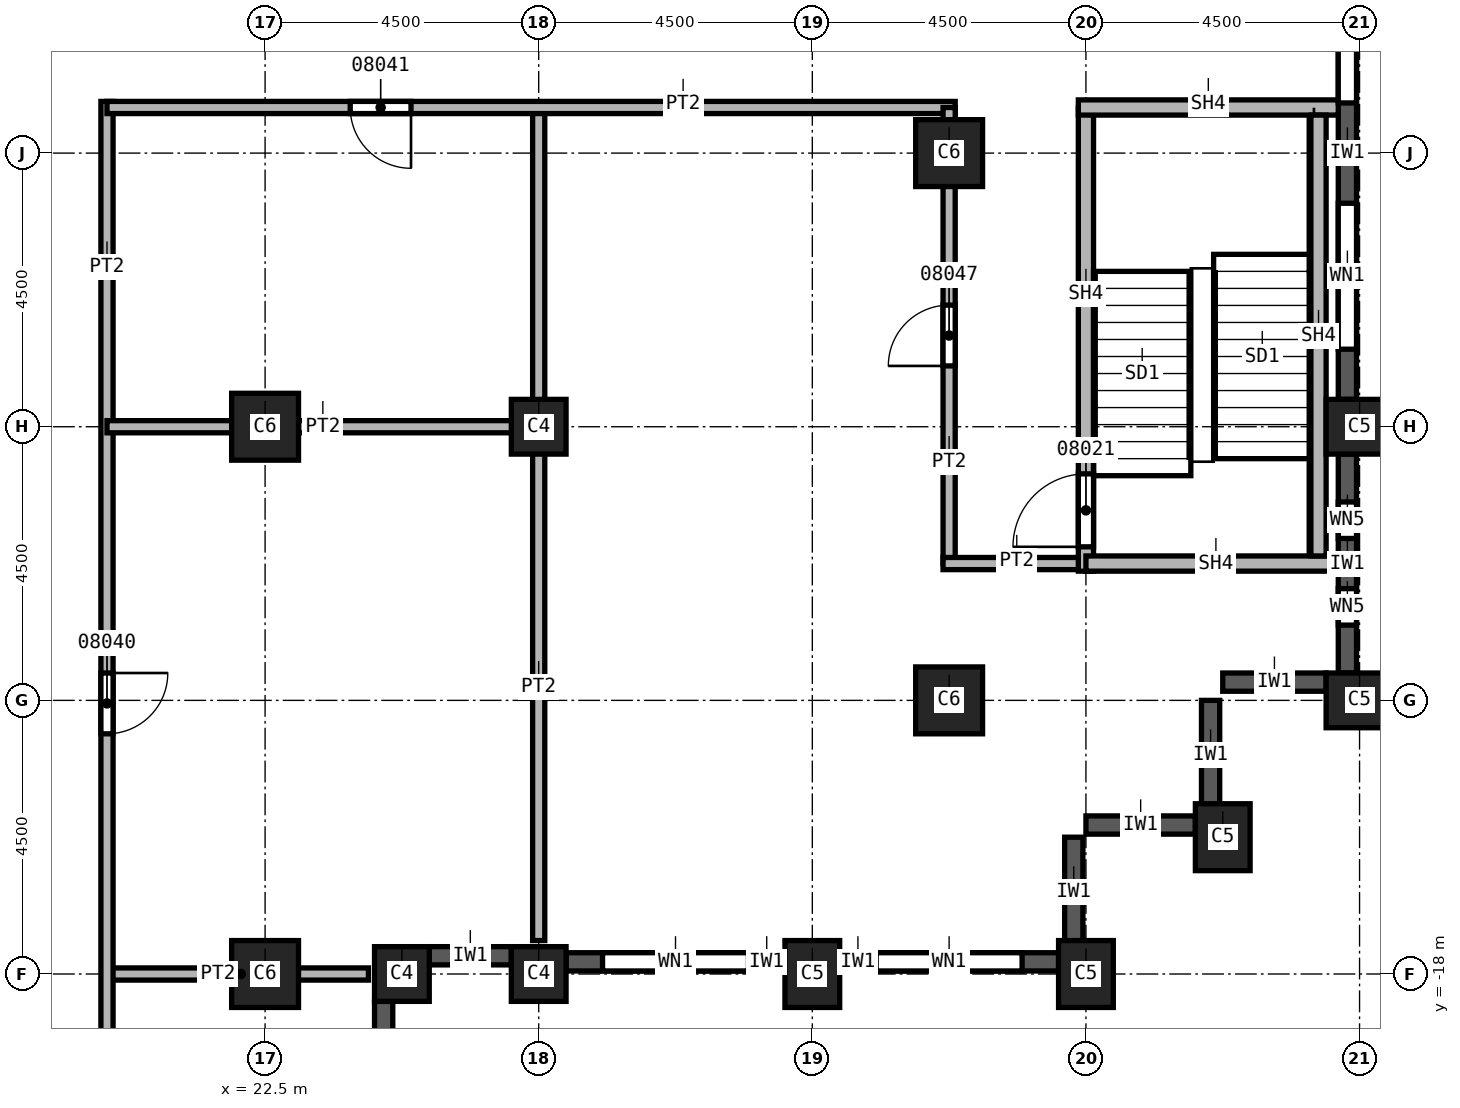
"""IFC4 building model, lengths in metres.
Left out: names, types, materials, properties, quantities, classifications, styles, units other than length and angle.
Written with IfcOpenShell. Run it as: python <this file> out.ifc"""

import sys

from ifc_helpers import new_model, si_unit, direction, frame, frame_2d, origin, origin_2d, place, context, subcontext, project, spatial, rectangle, extrude, element, fill, save


model = new_model("IFC4")
c1 = context("Model", 3, precision=1e-05, world=origin(), true_north=direction((0.0, 1.0)))
c2 = subcontext(c1, "Body", "Model", "MODEL_VIEW")
j1 = project(units=[si_unit("LENGTHUNIT", "METRE"), si_unit("PLANEANGLEUNIT", "RADIAN")], contexts=[c1])
p1 = place(None, origin())
s1 = spatial("IfcSite", under=j1, at=p1, CompositionType="ELEMENT")
p2 = place(p1, origin())
s2 = spatial("IfcBuilding", under=s1, at=p2, CompositionType="ELEMENT")
p3 = place(p2, frame((0.0, 0.0, 150.0)))
s3 = spatial("IfcBuildingStorey", under=s2, at=p3, CompositionType="ELEMENT", Elevation=150.0)
for number, where, z_axis, x_axis in (
    (1, (40.5, -9.0, 0.0), (0.0, 0.0, 1.0), (0.0, 1.0, 0.0)),
    (2, (40.5, -13.5, 0.0), (0.0, 0.0, 1.0), (0.0, 1.0, 0.0)),
    (3, (38.25, -15.75, 0.0), (0.0, 0.0, 1.0), (1.0, 0.0, 0.0)),
    (4, (31.5, -18.0, 0.0), (0.0, 0.0, 1.0), (1.0, 0.0, 0.0)),
    (5, (36.0, -18.0, 0.0), (0.0, 0.0, 1.0), (1.0, 0.0, 0.0)),
):
    element("IfcColumn", number, at=place(p3, frame(where, z_axis=z_axis, x_axis=x_axis)), inside=s3, PredefinedType="COLUMN", context=c2, shape_type="SweptSolid", body=[
        extrude(rectangle(XDim=0.9, YDim=1.1, at=origin_2d()), origin(), (0.0, 0.0, 1.0), 3.7),
    ])
for number, where, z_axis, x_axis in (
    (6, (33.75, -4.5, 0.0), (0.0, 0.0, 1.0), (1.0, 0.0, 0.0)),
    (7, (33.75, -13.5, 0.0), (0.0, 0.0, 1.0), (1.0, 0.0, 0.0)),
    (8, (22.5, -9.0, 0.0), (0.0, 0.0, 1.0), (1.0, 0.0, 0.0)),
    (9, (22.5, -18.0, 0.0), (0.0, 0.0, 1.0), (1.0, 0.0, 0.0)),
):
    element("IfcColumn", number, at=place(p3, frame(where, z_axis=z_axis, x_axis=x_axis)), inside=s3, PredefinedType="COLUMN", context=c2, shape_type="SweptSolid", body=[
        extrude(rectangle(XDim=1.1, YDim=1.1, at=origin_2d()), origin(), (0.0, 0.0, 1.0), 3.7),
    ])
for number, where, z_axis, x_axis in (
    (10, (27.0, -9.0, 0.0), (0.0, 0.0, 1.0), (1.0, 0.0, 0.0)),
    (11, (27.0, -18.0, 0.0), (0.0, 0.0, 1.0), (1.0, 0.0, 0.0)),
    (12, (24.75, -18.0, 0.0), (0.0, 0.0, 1.0), (1.0, 0.0, 0.0)),
):
    element("IfcColumn", number, at=place(p3, frame(where, z_axis=z_axis, x_axis=x_axis)), inside=s3, PredefinedType="COLUMN", context=c2, shape_type="SweptSolid", body=[
        extrude(rectangle(XDim=0.9, YDim=0.9, at=origin_2d()), origin(), (0.0, 0.0, 1.0), 3.7),
    ])
for number, where, z_axis, x_axis in (
    (13, (35.8, -17.55, 0.0), (0.0, 0.0, 1.0), (0.0, 1.0, 0.0)),
    (14, (37.8, -15.55, 0.0), (0.0, 0.0, 1.0), (-1.0, 0.0, 0.0)),
    (15, (38.05, -15.3, 0.0), (0.0, 0.0, 1.0), (0.0, 1.0, 0.0)),
):
    element("IfcWall", number, at=place(p3, frame(where, z_axis=z_axis, x_axis=x_axis)), inside=s3, PredefinedType="SOLIDWALL", context=c2, shape_type="SweptSolid", body=[
        extrude(rectangle(XDim=1.8, YDim=0.3, at=frame_2d((0.9, 0.0))), origin(), (0.0, 0.0, 1.0), 3.1),
    ])
p4 = place(p3, frame((39.95, -13.2, 0.0), z_axis=(0.0, 0.0, 1.0), x_axis=(-1.0, 0.0, 0.0)))
e16 = element("IfcWall", 16, at=p4, inside=s3, PredefinedType="SOLIDWALL", context=c2, shape_type="SweptSolid", body=[
    extrude(rectangle(XDim=1.7, YDim=0.3, at=frame_2d((0.85, 0.0))), origin(), (0.0, 0.0, 1.0), 3.1),
])
p5 = place(p3, frame((24.45, -20.35, 0.0), z_axis=(0.0, 0.0, 1.0), x_axis=(0.0, 1.0, 0.0)))
e17 = element("IfcWall", 17, at=p5, inside=s3, PredefinedType="SOLIDWALL", context=c2, shape_type="SweptSolid", body=[
    extrude(rectangle(XDim=1.9, YDim=0.3, at=frame_2d((0.95, 0.0))), origin(), (0.0, 0.0, 1.0), 3.1),
])
p6 = place(p3, frame((25.2, -17.7, 0.0), z_axis=(0.0, 0.0, 1.0), x_axis=(1.0, 0.0, 0.0)))
e18 = element("IfcWall", 18, at=p6, inside=s3, PredefinedType="SOLIDWALL", context=c2, shape_type="SweptSolid", body=[
    extrude(rectangle(XDim=1.35, YDim=0.3, at=frame_2d((0.675, 0.0))), origin(), (0.0, 0.0, 1.0), 3.1),
])
p7 = place(p3, frame((27.45, -17.8, 0.0), z_axis=(0.0, 0.0, 1.0), x_axis=(1.0, 0.0, 0.0)))
e19 = element("IfcWall", 19, at=p7, inside=s3, PredefinedType="SOLIDWALL", context=c2, shape_type="SweptSolid", body=[
    extrude(rectangle(XDim=3.6, YDim=0.3, at=frame_2d((1.8, 0.0))), origin(), (0.0, 0.0, 1.0), 3.1),
])
p8 = place(p7, frame((0.6, 0.0, 0.8)))
e20 = element("IfcOpeningElement", 20, at=p8, cuts=e19, PredefinedType="OPENING", context=c2, shape_type="SweptSolid", body=[
    extrude(rectangle(XDim=2.4, YDim=1.95, at=frame_2d((1.2, 0.975))), frame((0.0, 0.15, 0.0), z_axis=(0.0, -1.0, 0.0), x_axis=(1.0, 0.0, 0.0)), (0.0, 0.0, 1.0), 0.3),
])
p9 = place(p3, frame((31.95, -17.8, 0.0), z_axis=(0.0, 0.0, 1.0), x_axis=(1.0, 0.0, 0.0)))
e21 = element("IfcWall", 21, at=p9, inside=s3, PredefinedType="SOLIDWALL", context=c2, shape_type="SweptSolid", body=[
    extrude(rectangle(XDim=3.6, YDim=0.3, at=frame_2d((1.8, 0.0))), origin(), (0.0, 0.0, 1.0), 3.1),
])
p10 = place(p9, frame((0.6, 0.0, 0.8)))
e22 = element("IfcOpeningElement", 22, at=p10, cuts=e21, PredefinedType="OPENING", context=c2, shape_type="SweptSolid", body=[
    extrude(rectangle(XDim=2.4, YDim=1.95, at=frame_2d((1.2, 0.975))), frame((0.0, 0.15, 0.0), z_axis=(0.0, -1.0, 0.0), x_axis=(1.0, 0.0, 0.0)), (0.0, 0.0, 1.0), 0.3),
])
p11 = place(p3, frame((40.3, -13.05, 0.0), z_axis=(0.0, 0.0, 1.0), x_axis=(0.0, 1.0, 0.0)))
e23 = element("IfcWall", 23, at=p11, inside=s3, PredefinedType="SOLIDWALL", context=c2, shape_type="SweptSolid", body=[
    extrude(rectangle(XDim=3.6, YDim=0.3, at=frame_2d((1.8, 0.0))), origin(), (0.0, 0.0, 1.0), 3.1),
])
p12 = place(p11, frame((0.788, 0.0, 0.8)))
e24 = element("IfcOpeningElement", 24, at=p12, cuts=e23, PredefinedType="OPENING", context=c2, shape_type="SweptSolid", body=[
    extrude(rectangle(XDim=0.6, YDim=1.95, at=frame_2d((0.3, 0.975))), frame((0.0, 0.15, 0.0), z_axis=(0.0, -1.0, 0.0), x_axis=(1.0, 0.0, 0.0)), (0.0, 0.0, 1.0), 0.3),
])
p13 = place(p11, frame((2.212, 0.0, 0.8)))
e25 = element("IfcOpeningElement", 25, at=p13, cuts=e23, PredefinedType="OPENING", context=c2, shape_type="SweptSolid", body=[
    extrude(rectangle(XDim=0.6, YDim=1.95, at=frame_2d((0.3, 0.975))), frame((0.0, 0.15, 0.0), z_axis=(0.0, -1.0, 0.0), x_axis=(1.0, 0.0, 0.0)), (0.0, 0.0, 1.0), 0.3),
])
p14 = place(p3, frame((40.3, -8.55, 0.0), z_axis=(0.0, 0.0, 1.0), x_axis=(0.0, 1.0, 0.0)))
e26 = element("IfcWall", 26, at=p14, inside=s3, PredefinedType="SOLIDWALL", context=c2, shape_type="SweptSolid", body=[
    extrude(rectangle(XDim=8.1, YDim=0.3, at=frame_2d((4.05, 0.0))), origin(), (0.0, 0.0, 1.0), 3.1),
])
p15 = place(p14, frame((0.825, 0.0, 0.8)))
e27 = element("IfcOpeningElement", 27, at=p15, cuts=e26, PredefinedType="OPENING", context=c2, shape_type="SweptSolid", body=[
    extrude(rectangle(XDim=2.4, YDim=1.95, at=frame_2d((1.2, 0.975))), frame((0.0, 0.15, 0.0), z_axis=(0.0, -1.0, 0.0), x_axis=(1.0, 0.0, 0.0)), (0.0, 0.0, 1.0), 0.3),
])
p16 = place(p14, frame((4.875, 0.0, 0.8)))
e28 = element("IfcOpeningElement", 28, at=p16, cuts=e26, PredefinedType="OPENING", context=c2, shape_type="SweptSolid", body=[
    extrude(rectangle(XDim=2.4, YDim=1.95, at=frame_2d((1.2, 0.975))), frame((0.0, 0.15, 0.0), z_axis=(0.0, -1.0, 0.0), x_axis=(1.0, 0.0, 0.0)), (0.0, 0.0, 1.0), 0.3),
])
p17 = place(p3, frame((19.9, -18.0, 0.0), z_axis=(0.0, 0.0, 1.0), x_axis=(1.0, 0.0, 0.0)))
e29 = element("IfcWall", 29, at=p17, inside=s3, PredefinedType="PARTITIONING", context=c2, shape_type="SweptSolid", body=[
    extrude(rectangle(XDim=4.3, YDim=0.2, at=frame_2d((2.15, 0.0))), origin(), (0.0, 0.0, 1.0), 3.7),
])
p18 = place(p3, frame((19.9, -3.65, 0.0), z_axis=(0.0, 0.0, 1.0), x_axis=(0.0, -1.0, 0.0)))
e30 = element("IfcWall", 30, at=p18, inside=s3, PredefinedType="PARTITIONING", context=c2, shape_type="SweptSolid", body=[
    extrude(rectangle(XDim=19.6, YDim=0.2, at=frame_2d((9.8, 0.0))), origin(), (0.0, 0.0, 1.0), 3.7),
])
p19 = place(p18, frame((17.35, 0.0, 0.0)))
e31 = element("IfcOpeningElement", 31, at=p19, cuts=e30, PredefinedType="OPENING", context=c2, shape_type="SweptSolid", body=[
    extrude(rectangle(XDim=1.0, YDim=2.1, at=frame_2d((0.5, 1.05))), frame((0.0, 0.1, 0.0), z_axis=(0.0, -1.0, 0.0), x_axis=(1.0, 0.0, 0.0)), (0.0, 0.0, 1.0), 0.2),
])
p20 = place(p18, frame((9.4, 0.0, 0.0)))
e32 = element("IfcOpeningElement", 32, at=p20, cuts=e30, PredefinedType="OPENING", context=c2, shape_type="SweptSolid", body=[
    extrude(rectangle(XDim=1.0, YDim=2.1, at=frame_2d((0.5, 1.05))), frame((0.0, 0.1, 0.0), z_axis=(0.0, -1.0, 0.0), x_axis=(1.0, 0.0, 0.0)), (0.0, 0.0, 1.0), 0.2),
])
p21 = place(p3, frame((19.9, -9.0, 0.0), z_axis=(0.0, 0.0, 1.0), x_axis=(1.0, 0.0, 0.0)))
e33 = element("IfcWall", 33, at=p21, inside=s3, PredefinedType="PARTITIONING", context=c2, shape_type="SweptSolid", body=[
    extrude(rectangle(XDim=7.2, YDim=0.2, at=frame_2d((3.6, 0.0))), origin(), (0.0, 0.0, 1.0), 3.7),
])
p22 = place(p3, frame((27.0, -3.75, 0.0), z_axis=(0.0, 0.0, 1.0), x_axis=(0.0, -1.0, 0.0)))
e34 = element("IfcWall", 34, at=p22, inside=s3, PredefinedType="PARTITIONING", context=c2, shape_type="SweptSolid", body=[
    extrude(rectangle(XDim=13.7, YDim=0.2, at=frame_2d((6.85, 0.0))), origin(), (0.0, 0.0, 1.0), 3.7),
])
p23 = place(p3, frame((33.85, -3.75, 0.0), z_axis=(0.0, 0.0, 1.0), x_axis=(-1.0, 0.0, 0.0)))
e35 = element("IfcWall", 35, at=p23, inside=s3, PredefinedType="PARTITIONING", context=c2, shape_type="SweptSolid", body=[
    extrude(rectangle(XDim=13.95, YDim=0.2, at=frame_2d((6.975, 0.0))), origin(), (0.0, 0.0, 1.0), 3.7),
])
p24 = place(p23, frame((8.95, 0.0, 0.0)))
e36 = element("IfcOpeningElement", 36, at=p24, cuts=e35, PredefinedType="OPENING", context=c2, shape_type="SweptSolid", body=[
    extrude(rectangle(XDim=1.0, YDim=2.1, at=frame_2d((0.5, 1.05))), frame((0.0, 0.1, 0.0), z_axis=(0.0, -1.0, 0.0), x_axis=(1.0, 0.0, 0.0)), (0.0, 0.0, 1.0), 0.2),
])
p25 = place(p3, frame((33.75, -11.25, 0.0), z_axis=(0.0, 0.0, 1.0), x_axis=(0.0, 1.0, 0.0)))
e37 = element("IfcWall", 37, at=p25, inside=s3, PredefinedType="PARTITIONING", context=c2, shape_type="SweptSolid", body=[
    extrude(rectangle(XDim=7.5, YDim=0.2, at=frame_2d((3.75, 0.0))), origin(), (0.0, 0.0, 1.0), 3.7),
])
p26 = place(p25, frame((3.25, 0.0, 0.0)))
e38 = element("IfcOpeningElement", 38, at=p26, cuts=e37, PredefinedType="OPENING", context=c2, shape_type="SweptSolid", body=[
    extrude(rectangle(XDim=1.0, YDim=2.1, at=frame_2d((0.5, 1.05))), frame((0.0, 0.1, 0.0), z_axis=(0.0, -1.0, 0.0), x_axis=(1.0, 0.0, 0.0)), (0.0, 0.0, 1.0), 0.2),
])
p27 = place(p3, frame((36.0, -11.25, 0.0), z_axis=(0.0, 0.0, 1.0), x_axis=(-1.0, 0.0, 0.0)))
e39 = element("IfcWall", 39, at=p27, inside=s3, PredefinedType="PARTITIONING", context=c2, shape_type="SweptSolid", body=[
    extrude(rectangle(XDim=2.35, YDim=0.2, at=frame_2d((1.175, 0.0))), origin(), (0.0, 0.0, 1.0), 3.7),
])
p28 = place(p3, frame((36.0, -11.375, 0.0), z_axis=(0.0, 0.0, 1.0), x_axis=(0.0, 1.0, 0.0)))
e40 = element("IfcWall", 40, at=p28, inside=s3, PredefinedType="SOLIDWALL", context=c2, shape_type="SweptSolid", body=[
    extrude(rectangle(XDim=7.625, YDim=0.25, at=frame_2d((3.812, 0.0))), origin(), (0.0, 0.0, 1.0), 3.7),
])
p29 = place(p28, frame((0.4, 0.0, 0.0)))
e41 = element("IfcOpeningElement", 41, at=p29, cuts=e40, PredefinedType="OPENING", context=c2, shape_type="SweptSolid", body=[
    extrude(rectangle(XDim=1.2, YDim=2.1, at=frame_2d((0.6, 1.05))), frame((0.0, 0.125, 0.0), z_axis=(0.0, -1.0, 0.0), x_axis=(1.0, 0.0, 0.0)), (0.0, 0.0, 1.0), 0.25),
])
p30 = place(p3, frame((40.15, -11.25, 0.0), z_axis=(0.0, 0.0, 1.0), x_axis=(-1.0, 0.0, 0.0)))
e42 = element("IfcWall", 42, at=p30, inside=s3, PredefinedType="SOLIDWALL", context=c2, shape_type="SweptSolid", body=[
    extrude(rectangle(XDim=4.15, YDim=0.25, at=frame_2d((2.075, 0.0))), origin(), (0.0, 0.0, 1.0), 3.7),
])
p31 = place(p3, frame((40.15, -3.75, 0.0), z_axis=(0.0, 0.0, 1.0), x_axis=(-1.0, 0.0, 0.0)))
e43 = element("IfcWall", 43, at=p31, inside=s3, PredefinedType="SOLIDWALL", context=c2, shape_type="SweptSolid", body=[
    extrude(rectangle(XDim=4.275, YDim=0.25, at=frame_2d((2.137, 0.0))), origin(), (0.0, 0.0, 1.0), 3.7),
])
p32 = place(p3, frame((39.825, -11.125, 0.0), z_axis=(0.0, 0.0, 1.0), x_axis=(0.0, 1.0, 0.0)))
e44 = element("IfcWall", 44, at=p32, inside=s3, PredefinedType="SOLIDWALL", context=c2, shape_type="SweptSolid", body=[
    extrude(rectangle(XDim=7.25, YDim=0.25, at=frame_2d((3.625, 0.0))), origin(), (0.0, 0.0, 1.0), 3.7),
])
p33 = place(p8, origin())
e45 = element("IfcWindow", 45, at=p33, inside=s3, PartitioningType="SINGLE_PANEL", PredefinedType="WINDOW", context=c2, shape_type="SweptSolid", body=[
    extrude(rectangle(XDim=2.4, YDim=1.95, at=frame_2d((1.2, 0.975))), frame((0.0, 0.03, 0.0), z_axis=(0.0, -1.0, 0.0), x_axis=(1.0, 0.0, 0.0)), (0.0, 0.0, 1.0), 0.06),
])
fill(e20, e45)
p34 = place(p10, origin())
e46 = element("IfcWindow", 46, at=p34, inside=s3, PartitioningType="SINGLE_PANEL", PredefinedType="WINDOW", context=c2, shape_type="SweptSolid", body=[
    extrude(rectangle(XDim=2.4, YDim=1.95, at=frame_2d((1.2, 0.975))), frame((0.0, 0.03, 0.0), z_axis=(0.0, -1.0, 0.0), x_axis=(1.0, 0.0, 0.0)), (0.0, 0.0, 1.0), 0.06),
])
fill(e22, e46)
p35 = place(p15, origin())
e47 = element("IfcWindow", 47, at=p35, inside=s3, PartitioningType="SINGLE_PANEL", PredefinedType="WINDOW", context=c2, shape_type="SweptSolid", body=[
    extrude(rectangle(XDim=2.4, YDim=1.95, at=frame_2d((1.2, 0.975))), frame((0.0, 0.03, 0.0), z_axis=(0.0, -1.0, 0.0), x_axis=(1.0, 0.0, 0.0)), (0.0, 0.0, 1.0), 0.06),
])
fill(e27, e47)
p36 = place(p16, origin())
e48 = element("IfcWindow", 48, at=p36, inside=s3, PartitioningType="SINGLE_PANEL", PredefinedType="WINDOW", context=c2, shape_type="SweptSolid", body=[
    extrude(rectangle(XDim=2.4, YDim=1.95, at=frame_2d((1.2, 0.975))), frame((0.0, 0.03, 0.0), z_axis=(0.0, -1.0, 0.0), x_axis=(1.0, 0.0, 0.0)), (0.0, 0.0, 1.0), 0.06),
])
fill(e28, e48)
p37 = place(p29, origin())
e49 = element("IfcDoor", 49, at=p37, inside=s3, OperationType="SINGLE_SWING_RIGHT", PredefinedType="DOOR", context=c2, shape_type="SweptSolid", body=[
    extrude(rectangle(XDim=1.2, YDim=2.1, at=frame_2d((0.6, 1.05))), frame((0.0, 0.025, 0.0), z_axis=(0.0, -1.0, 0.0), x_axis=(1.0, 0.0, 0.0)), (0.0, 0.0, 1.0), 0.05),
])
fill(e41, e49)
p38 = place(p20, origin())
e50 = element("IfcDoor", 50, at=p38, inside=s3, OperationType="SINGLE_SWING_LEFT", PredefinedType="DOOR", context=c2, shape_type="SweptSolid", body=[
    extrude(rectangle(XDim=1.0, YDim=2.1, at=frame_2d((0.5, 1.05))), frame((0.0, 0.025, 0.0), z_axis=(0.0, -1.0, 0.0), x_axis=(1.0, 0.0, 0.0)), (0.0, 0.0, 1.0), 0.05),
])
fill(e32, e50)
p39 = place(p24, origin())
e51 = element("IfcDoor", 51, at=p39, inside=s3, OperationType="SINGLE_SWING_RIGHT", PredefinedType="DOOR", context=c2, shape_type="SweptSolid", body=[
    extrude(rectangle(XDim=1.0, YDim=2.1, at=frame_2d((0.5, 1.05))), frame((0.0, 0.025, 0.0), z_axis=(0.0, -1.0, 0.0), x_axis=(1.0, 0.0, 0.0)), (0.0, 0.0, 1.0), 0.05),
])
fill(e36, e51)
p40 = place(p26, origin())
e52 = element("IfcDoor", 52, at=p40, inside=s3, OperationType="SINGLE_SWING_RIGHT", PredefinedType="DOOR", context=c2, shape_type="SweptSolid", body=[
    extrude(rectangle(XDim=1.0, YDim=2.1, at=frame_2d((0.5, 1.05))), frame((0.0, 0.025, 0.0), z_axis=(0.0, -1.0, 0.0), x_axis=(1.0, 0.0, 0.0)), (0.0, 0.0, 1.0), 0.05),
])
fill(e38, e52)
p41 = place(p12, origin())
e53 = element("IfcWindow", 53, at=p41, inside=s3, PartitioningType="SINGLE_PANEL", PredefinedType="WINDOW", context=c2, shape_type="SweptSolid", body=[
    extrude(rectangle(XDim=0.6, YDim=1.95, at=frame_2d((0.3, 0.975))), frame((0.0, 0.03, 0.0), z_axis=(0.0, -1.0, 0.0), x_axis=(1.0, 0.0, 0.0)), (0.0, 0.0, 1.0), 0.06),
])
fill(e24, e53)
p42 = place(p13, origin())
e54 = element("IfcWindow", 54, at=p42, inside=s3, PartitioningType="SINGLE_PANEL", PredefinedType="WINDOW", context=c2, shape_type="SweptSolid", body=[
    extrude(rectangle(XDim=0.6, YDim=1.95, at=frame_2d((0.3, 0.975))), frame((0.0, 0.03, 0.0), z_axis=(0.0, -1.0, 0.0), x_axis=(1.0, 0.0, 0.0)), (0.0, 0.0, 1.0), 0.06),
])
fill(e25, e54)
save(model, sys.argv[1])
